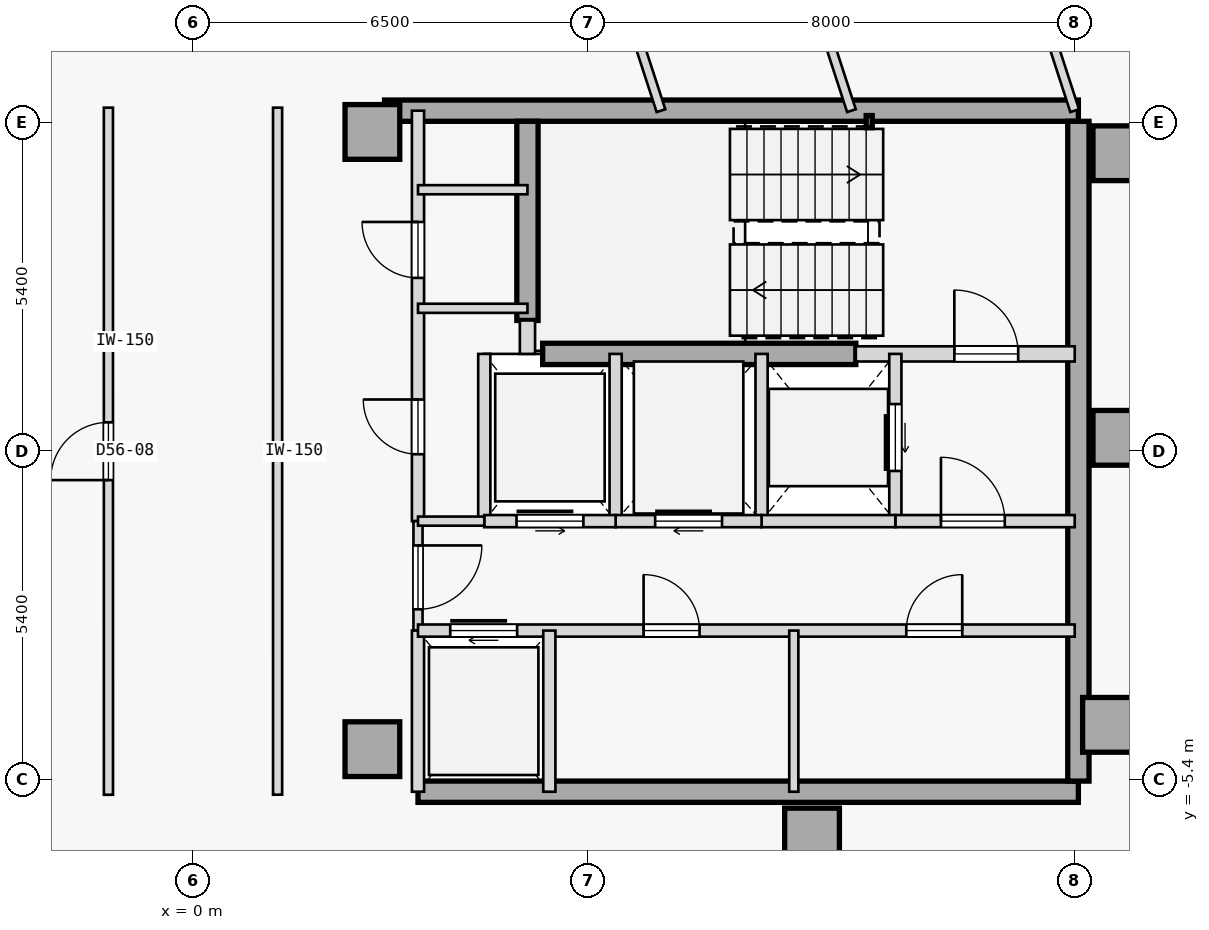
"""IFC4 building model, lengths in metres.
Left out: names, types, materials, properties, quantities, classifications, styles, units other than length and angle.
Written with IfcOpenShell. Run it as: python <this file> out.ifc"""

import sys

from ifc_helpers import new_model, si_unit, direction, frame, frame_2d, origin, origin_2d, place, context, subcontext, project, spatial, rectangle, hollow_rectangle, extrude, element, fill, save


model = new_model("IFC4")
c1 = context("Model", 3, precision=1e-05, world=origin(), true_north=direction((0.0, 1.0)))
c2 = subcontext(c1, "Body", "Model", "MODEL_VIEW")
j1 = project(units=[si_unit("LENGTHUNIT", "METRE"), si_unit("PLANEANGLEUNIT", "RADIAN")], contexts=[c1])
p1 = place(None, origin())
s1 = spatial("IfcSite", under=j1, at=p1, CompositionType="ELEMENT")
p2 = place(p1, origin())
s2 = spatial("IfcBuilding", under=s1, at=p2, CompositionType="ELEMENT")
p3 = place(p2, frame((0.0, 0.0, 214.25)))
s3 = spatial("IfcBuildingStorey", under=s2, at=p3, CompositionType="ELEMENT", Elevation=214.25)
for number, where, z_axis, x_axis in (
    (1, (15.25, 4.9, 0.0), (0.0, 0.0, 1.0), (1.0, 0.0, 0.0)),
    (2, (15.25, 0.22, 0.0), (0.0, 0.0, 1.0), (1.0, 0.0, 0.0)),
    (3, (15.08, -4.5, 0.0), (0.0, 0.0, 1.0), (1.0, 0.0, 0.0)),
    (4, (10.18, -6.32, 0.0), (0.0, 0.0, 1.0), (1.0, 0.0, 0.0)),
    (5, (2.95, -4.9, 0.0), (0.0, 0.0, 1.0), (1.0, 0.0, 0.0)),
    (6, (2.95, 5.25, 0.0), (0.0, 0.0, 1.0), (1.0, 0.0, 0.0)),
):
    element("IfcColumn", number, at=place(p3, frame(where, z_axis=z_axis, x_axis=x_axis)), inside=s3, PredefinedType="COLUMN", context=c2, shape_type="SweptSolid", body=[
        extrude(rectangle(XDim=0.9, YDim=0.9, at=origin_2d()), origin(), (0.0, 0.0, 1.0), 3.35),
    ])
p4 = place(p3, frame((3.15, 5.6, 0.0), z_axis=(0.0, 0.0, 1.0), x_axis=(1.0, 0.0, 0.0)))
e7 = element("IfcWall", 7, at=p4, inside=s3, PredefinedType="SHEAR", context=c2, shape_type="SweptSolid", body=[
    extrude(rectangle(XDim=11.41, YDim=0.35, at=frame_2d((5.705, 0.0))), origin(), (0.0, 0.0, 1.0), 3.125),
])
p5 = place(p3, frame((3.7, -5.6, 0.0), z_axis=(0.0, 0.0, 1.0), x_axis=(1.0, 0.0, 0.0)))
e8 = element("IfcWall", 8, at=p5, inside=s3, PredefinedType="SHEAR", context=c2, shape_type="SweptSolid", body=[
    extrude(rectangle(XDim=10.86, YDim=0.35, at=frame_2d((5.43, 0.0))), origin(), (0.0, 0.0, 1.0), 3.125),
])
p6 = place(p3, frame((14.56, -5.425, 0.0), z_axis=(0.0, 0.0, 1.0), x_axis=(0.0, 1.0, 0.0)))
e9 = element("IfcWall", 9, at=p6, inside=s3, PredefinedType="SHEAR", context=c2, shape_type="SweptSolid", body=[
    extrude(rectangle(XDim=10.85, YDim=0.35, at=frame_2d((5.425, 0.0))), origin(), (0.0, 0.0, 1.0), 3.125),
])
p7 = place(p3, frame((5.5, 2.15, 0.0), z_axis=(0.0, 0.0, 1.0), x_axis=(0.0, 1.0, 0.0)))
e10 = element("IfcWall", 10, at=p7, inside=s3, PredefinedType="SHEAR", context=c2, shape_type="SweptSolid", body=[
    extrude(rectangle(XDim=3.275, YDim=0.35, at=frame_2d((1.638, 0.0))), origin(), (0.0, 0.0, 1.0), 3.125),
])
p8 = place(p3, frame((5.75, 1.6, 0.0), z_axis=(0.0, 0.0, 1.0), x_axis=(1.0, 0.0, 0.0)))
e11 = element("IfcWall", 11, at=p8, inside=s3, PredefinedType="SHEAR", context=c2, shape_type="SweptSolid", body=[
    extrude(rectangle(XDim=5.15, YDim=0.35, at=frame_2d((2.575, 0.0))), origin(), (0.0, 0.0, 1.0), 3.125),
])
p9 = place(p3, frame((11.12, 5.42, 0.0), z_axis=(0.0, 0.0, 1.0), x_axis=(1.0, 0.0, 0.0)))
e12 = element("IfcColumn", 12, at=p9, inside=s3, PredefinedType="COLUMN", context=c2, shape_type="SweptSolid", body=[
    extrude(hollow_rectangle(XDim=0.1, YDim=0.2, WallThickness=0.008, at=origin_2d()), origin(), (0.0, 0.0, 1.0), 3.35),
])
p10 = place(p3, frame((10.9, 1.6, 0.0), z_axis=(0.0, 0.0, 1.0), x_axis=(1.0, 0.0, 0.0)))
e13 = element("IfcWall", 13, at=p10, inside=s3, PredefinedType="STANDARD", context=c2, shape_type="SweptSolid", body=[
    extrude(rectangle(XDim=3.6, YDim=0.25, at=frame_2d((1.8, 0.0))), origin(), (0.0, 0.0, 1.0), 3.125),
])
p11 = place(p10, frame((1.62, 0.0, 0.0)))
e14 = element("IfcOpeningElement", 14, at=p11, cuts=e13, PredefinedType="OPENING", context=c2, shape_type="SweptSolid", body=[
    extrude(rectangle(XDim=1.05, YDim=2.15, at=frame_2d((0.525, 1.075))), frame((0.0, 0.135, 0.0), z_axis=(0.0, -1.0, 0.0), x_axis=(1.0, 0.0, 0.0)), (0.0, 0.0, 1.0), 0.27),
])
p12 = place(p3, frame((5.5, 1.6, 0.0), z_axis=(0.0, 0.0, 1.0), x_axis=(0.0, 1.0, 0.0)))
e15 = element("IfcWall", 15, at=p12, inside=s3, PredefinedType="STANDARD", context=c2, shape_type="SweptSolid", body=[
    extrude(rectangle(XDim=0.55, YDim=0.25, at=frame_2d((0.275, 0.0))), origin(), (0.0, 0.0, 1.0), 3.125),
])
p13 = place(p3, frame((3.7, -1.15, 0.0), z_axis=(0.0, 0.0, 1.0), x_axis=(0.0, 1.0, 0.0)))
e16 = element("IfcWall", 16, at=p13, inside=s3, PredefinedType="STANDARD", context=c2, shape_type="SweptSolid", body=[
    extrude(rectangle(XDim=6.75, YDim=0.2, at=frame_2d((3.375, 0.0))), origin(), (0.0, 0.0, 1.0), 3.125),
])
p14 = place(p13, frame((1.1, 0.0, 0.0)))
e17 = element("IfcOpeningElement", 17, at=p14, cuts=e16, PredefinedType="OPENING", context=c2, shape_type="SweptSolid", body=[
    extrude(rectangle(XDim=0.9, YDim=2.15, at=frame_2d((0.45, 1.075))), frame((0.0, 0.11, 0.0), z_axis=(0.0, -1.0, 0.0), x_axis=(1.0, 0.0, 0.0)), (0.0, 0.0, 1.0), 0.22),
])
p15 = place(p13, frame((4.0, 0.0, 0.0)))
e18 = element("IfcOpeningElement", 18, at=p15, cuts=e16, PredefinedType="OPENING", context=c2, shape_type="SweptSolid", body=[
    extrude(rectangle(XDim=0.92, YDim=2.15, at=frame_2d((0.46, 1.075))), frame((0.0, 0.11, 0.0), z_axis=(0.0, -1.0, 0.0), x_axis=(1.0, 0.0, 0.0)), (0.0, 0.0, 1.0), 0.22),
])
p16 = place(p3, frame((3.7, -2.95, 0.0), z_axis=(0.0, 0.0, 1.0), x_axis=(0.0, 1.0, 0.0)))
e19 = element("IfcWall", 19, at=p16, inside=s3, PredefinedType="PARTITIONING", context=c2, shape_type="SweptSolid", body=[
    extrude(rectangle(XDim=1.8, YDim=0.15, at=frame_2d((0.9, 0.0))), origin(), (0.0, 0.0, 1.0), 3.125),
])
p17 = place(p16, frame((0.35, 0.0, 0.0)))
e20 = element("IfcOpeningElement", 20, at=p17, cuts=e19, PredefinedType="OPENING", context=c2, shape_type="SweptSolid", body=[
    extrude(rectangle(XDim=1.05, YDim=2.18, at=frame_2d((0.525, 1.09))), frame((0.0, 0.085, 0.0), z_axis=(0.0, -1.0, 0.0), x_axis=(1.0, 0.0, 0.0)), (0.0, 0.0, 1.0), 0.17),
])
p18 = place(p3, frame((3.7, -5.6, 0.0), z_axis=(0.0, 0.0, 1.0), x_axis=(0.0, 1.0, 0.0)))
e21 = element("IfcWall", 21, at=p18, inside=s3, PredefinedType="STANDARD", context=c2, shape_type="SweptSolid", body=[
    extrude(rectangle(XDim=2.65, YDim=0.2, at=frame_2d((1.325, 0.0))), origin(), (0.0, 0.0, 1.0), 3.125),
])
p19 = place(p3, frame((11.55, -1.15, 0.0), z_axis=(0.0, 0.0, 1.0), x_axis=(0.0, 1.0, 0.0)))
e22 = element("IfcWall", 22, at=p19, inside=s3, PredefinedType="STANDARD", context=c2, shape_type="SweptSolid", body=[
    extrude(rectangle(XDim=2.75, YDim=0.2, at=frame_2d((1.375, 0.0))), origin(), (0.0, 0.0, 1.0), 3.125),
])
p20 = place(p19, frame((0.825, 0.0, 0.0)))
e23 = element("IfcOpeningElement", 23, at=p20, cuts=e22, PredefinedType="OPENING", context=c2, shape_type="SweptSolid", body=[
    extrude(rectangle(XDim=1.1, YDim=2.15, at=frame_2d((0.55, 1.075))), frame((0.0, 0.11, 0.0), z_axis=(0.0, -1.0, 0.0), x_axis=(1.0, 0.0, 0.0)), (0.0, 0.0, 1.0), 0.22),
])
p21 = place(p3, frame((9.35, -1.15, 0.0), z_axis=(0.0, 0.0, 1.0), x_axis=(0.0, 1.0, 0.0)))
e24 = element("IfcWall", 24, at=p21, inside=s3, PredefinedType="STANDARD", context=c2, shape_type="SweptSolid", body=[
    extrude(rectangle(XDim=2.75, YDim=0.2, at=frame_2d((1.375, 0.0))), origin(), (0.0, 0.0, 1.0), 3.125),
])
p22 = place(p3, frame((11.55, -1.15, 0.0), z_axis=(0.0, 0.0, 1.0), x_axis=(1.0, 0.0, 0.0)))
e25 = element("IfcWall", 25, at=p22, inside=s3, PredefinedType="STANDARD", context=c2, shape_type="SweptSolid", body=[
    extrude(rectangle(XDim=2.95, YDim=0.2, at=frame_2d((1.475, 0.0))), origin(), (0.0, 0.0, 1.0), 3.125),
])
p23 = place(p22, frame((0.75, 0.0, 0.0)))
e26 = element("IfcOpeningElement", 26, at=p23, cuts=e25, PredefinedType="OPENING", context=c2, shape_type="SweptSolid", body=[
    extrude(rectangle(XDim=1.05, YDim=2.18, at=frame_2d((0.525, 1.09))), frame((0.0, 0.11, 0.0), z_axis=(0.0, -1.0, 0.0), x_axis=(1.0, 0.0, 0.0)), (0.0, 0.0, 1.0), 0.22),
])
p24 = place(p3, frame((9.35, -1.15, 0.0), z_axis=(0.0, 0.0, 1.0), x_axis=(1.0, 0.0, 0.0)))
e27 = element("IfcWall", 27, at=p24, inside=s3, PredefinedType="STANDARD", context=c2, shape_type="SweptSolid", body=[
    extrude(rectangle(XDim=2.2, YDim=0.2, at=frame_2d((1.1, 0.0))), origin(), (0.0, 0.0, 1.0), 3.125),
])
p25 = place(p3, frame((6.95, -1.15, 0.0), z_axis=(0.0, 0.0, 1.0), x_axis=(0.0, 1.0, 0.0)))
e28 = element("IfcWall", 28, at=p25, inside=s3, PredefinedType="STANDARD", context=c2, shape_type="SweptSolid", body=[
    extrude(rectangle(XDim=2.75, YDim=0.2, at=frame_2d((1.375, 0.0))), origin(), (0.0, 0.0, 1.0), 3.125),
])
p26 = place(p3, frame((6.95, -1.15, 0.0), z_axis=(0.0, 0.0, 1.0), x_axis=(1.0, 0.0, 0.0)))
e29 = element("IfcWall", 29, at=p26, inside=s3, PredefinedType="STANDARD", context=c2, shape_type="SweptSolid", body=[
    extrude(rectangle(XDim=2.4, YDim=0.2, at=frame_2d((1.2, 0.0))), origin(), (0.0, 0.0, 1.0), 3.125),
])
p27 = place(p26, frame((0.65, 0.0, 0.0)))
e30 = element("IfcOpeningElement", 30, at=p27, cuts=e29, PredefinedType="OPENING", context=c2, shape_type="SweptSolid", body=[
    extrude(rectangle(XDim=1.1, YDim=2.15, at=frame_2d((0.55, 1.075))), frame((0.0, 0.11, 0.0), z_axis=(0.0, -1.0, 0.0), x_axis=(1.0, 0.0, 0.0)), (0.0, 0.0, 1.0), 0.22),
])
p28 = place(p3, frame((4.79, -1.15, 0.0), z_axis=(0.0, 0.0, 1.0), x_axis=(0.0, 1.0, 0.0)))
e31 = element("IfcWall", 31, at=p28, inside=s3, PredefinedType="STANDARD", context=c2, shape_type="SweptSolid", body=[
    extrude(rectangle(XDim=2.75, YDim=0.2, at=frame_2d((1.375, 0.0))), origin(), (0.0, 0.0, 1.0), 3.125),
])
p29 = place(p3, frame((4.79, -1.15, 0.0), z_axis=(0.0, 0.0, 1.0), x_axis=(1.0, 0.0, 0.0)))
e32 = element("IfcWall", 32, at=p29, inside=s3, PredefinedType="STANDARD", context=c2, shape_type="SweptSolid", body=[
    extrude(rectangle(XDim=2.16, YDim=0.2, at=frame_2d((1.08, 0.0))), origin(), (0.0, 0.0, 1.0), 3.125),
])
p30 = place(p29, frame((0.53, 0.0, 0.0)))
e33 = element("IfcOpeningElement", 33, at=p30, cuts=e32, PredefinedType="OPENING", context=c2, shape_type="SweptSolid", body=[
    extrude(rectangle(XDim=1.1, YDim=2.15, at=frame_2d((0.55, 1.075))), frame((0.0, 0.11, 0.0), z_axis=(0.0, -1.0, 0.0), x_axis=(1.0, 0.0, 0.0)), (0.0, 0.0, 1.0), 0.22),
])
p31 = place(p3, frame((3.7, -1.15, 0.0), z_axis=(0.0, 0.0, 1.0), x_axis=(1.0, 0.0, 0.0)))
e34 = element("IfcWall", 34, at=p31, inside=s3, PredefinedType="PARTITIONING", context=c2, shape_type="SweptSolid", body=[
    extrude(rectangle(XDim=1.09, YDim=0.15, at=frame_2d((0.545, 0.0))), origin(), (0.0, 0.0, 1.0), 3.125),
])
p32 = place(p3, frame((3.7, -2.95, 0.0), z_axis=(0.0, 0.0, 1.0), x_axis=(1.0, 0.0, 0.0)))
e35 = element("IfcWall", 35, at=p32, inside=s3, PredefinedType="STANDARD", context=c2, shape_type="SweptSolid", body=[
    extrude(rectangle(XDim=10.8, YDim=0.2, at=frame_2d((5.4, 0.0))), origin(), (0.0, 0.0, 1.0), 3.125),
])
p33 = place(p32, frame((0.53, 0.0, 0.0)))
e36 = element("IfcOpeningElement", 36, at=p33, cuts=e35, PredefinedType="OPENING", context=c2, shape_type="SweptSolid", body=[
    extrude(rectangle(XDim=1.1, YDim=2.15, at=frame_2d((0.55, 1.075))), frame((0.0, 0.11, 0.0), z_axis=(0.0, -1.0, 0.0), x_axis=(1.0, 0.0, 0.0)), (0.0, 0.0, 1.0), 0.22),
])
p34 = place(p32, frame((3.71, 0.0, 0.0)))
e37 = element("IfcOpeningElement", 37, at=p34, cuts=e35, PredefinedType="OPENING", context=c2, shape_type="SweptSolid", body=[
    extrude(rectangle(XDim=0.92, YDim=2.15, at=frame_2d((0.46, 1.075))), frame((0.0, 0.11, 0.0), z_axis=(0.0, -1.0, 0.0), x_axis=(1.0, 0.0, 0.0)), (0.0, 0.0, 1.0), 0.22),
])
p35 = place(p32, frame((8.03, 0.0, 0.0)))
e38 = element("IfcOpeningElement", 38, at=p35, cuts=e35, PredefinedType="OPENING", context=c2, shape_type="SweptSolid", body=[
    extrude(rectangle(XDim=0.92, YDim=2.15, at=frame_2d((0.46, 1.075))), frame((0.0, 0.11, 0.0), z_axis=(0.0, -1.0, 0.0), x_axis=(1.0, 0.0, 0.0)), (0.0, 0.0, 1.0), 0.22),
])
p36 = place(p3, frame((5.86, -5.6, 0.0), z_axis=(0.0, 0.0, 1.0), x_axis=(0.0, 1.0, 0.0)))
e39 = element("IfcWall", 39, at=p36, inside=s3, PredefinedType="STANDARD", context=c2, shape_type="SweptSolid", body=[
    extrude(rectangle(XDim=2.65, YDim=0.2, at=frame_2d((1.325, 0.0))), origin(), (0.0, 0.0, 1.0), 3.125),
])
p37 = place(p3, frame((9.88, -5.6, 0.0), z_axis=(0.0, 0.0, 1.0), x_axis=(0.0, 1.0, 0.0)))
e40 = element("IfcWall", 40, at=p37, inside=s3, PredefinedType="PARTITIONING", context=c2, shape_type="SweptSolid", body=[
    extrude(rectangle(XDim=2.65, YDim=0.15, at=frame_2d((1.325, 0.0))), origin(), (0.0, 0.0, 1.0), 3.125),
])
for number, where, z_axis, x_axis in (
    (41, (3.7, 4.3, 0.0), (0.0, 0.0, 1.0), (1.0, 0.0, 0.0)),
    (42, (3.7, 2.35, 0.0), (0.0, 0.0, 1.0), (1.0, 0.0, 0.0)),
):
    element("IfcWall", number, at=place(p3, frame(where, z_axis=z_axis, x_axis=x_axis)), inside=s3, PredefinedType="PARTITIONING", context=c2, shape_type="SweptSolid", body=[
        extrude(rectangle(XDim=1.8, YDim=0.15, at=frame_2d((0.9, 0.0))), origin(), (0.0, 0.0, 1.0), 3.125),
    ])
p38 = place(p3, frame((-1.391, -5.65, 0.0), z_axis=(0.0, 0.0, 1.0), x_axis=(-8.6422954e-05, 0.999999996266, 0.0)))
e43 = element("IfcWall", 43, at=p38, inside=s3, PredefinedType="PARTITIONING", context=c2, shape_type="SweptSolid", body=[
    extrude(rectangle(XDim=11.3, YDim=0.15, at=frame_2d((5.65, 0.0))), origin(), (0.0, 0.0, 1.0), 3.125),
])
p39 = place(p38, frame((5.175, 0.0, 0.0)))
e44 = element("IfcOpeningElement", 44, at=p39, cuts=e43, PredefinedType="OPENING", context=c2, shape_type="SweptSolid", body=[
    extrude(rectangle(XDim=0.95, YDim=2.15, at=frame_2d((0.475, 1.075))), frame((0.0, 0.085, 0.0), z_axis=(0.0, -1.0, 0.0), x_axis=(1.0, 0.0, 0.0)), (0.0, 0.0, 1.0), 0.17),
])
p40 = place(p3, frame((1.391, -5.648, 0.0), z_axis=(0.0, 0.0, 1.0), x_axis=(-4.3218947e-05, 0.999999999066, 0.0)))
e45 = element("IfcWall", 45, at=p40, inside=s3, PredefinedType="PARTITIONING", context=c2, shape_type="SweptSolid", body=[
    extrude(rectangle(XDim=11.298, YDim=0.15, at=frame_2d((5.649, 0.0))), origin(), (0.0, 0.0, 1.0), 3.125),
])
p41 = place(p3, frame((7.696, 5.599, 0.0), z_axis=(0.0, 0.0, 1.0), x_axis=(-0.309022497646, 0.951054728157, 0.0)))
e46 = element("IfcWall", 46, at=p41, inside=s3, PredefinedType="PARTITIONING", context=c2, shape_type="SweptSolid", body=[
    extrude(rectangle(XDim=6.86, YDim=0.15, at=frame_2d((3.43, 0.0))), origin(), (0.0, 0.0, 1.0), 3.125),
])
p42 = place(p3, frame((10.828, 5.6, 0.0), z_axis=(0.0, 0.0, 1.0), x_axis=(-0.30901342663, 0.951057675519, 0.0)))
e47 = element("IfcWall", 47, at=p42, inside=s3, PredefinedType="PARTITIONING", context=c2, shape_type="SweptSolid", body=[
    extrude(rectangle(XDim=7.827, YDim=0.15, at=frame_2d((3.914, 0.0))), origin(), (0.0, 0.0, 1.0), 3.125),
])
p43 = place(p3, frame((14.5, 5.6, 0.0), z_axis=(0.0, 0.0, 1.0), x_axis=(-0.308872364299, 0.951103497298, 0.0)))
e48 = element("IfcWall", 48, at=p43, inside=s3, PredefinedType="PARTITIONING", context=c2, shape_type="SweptSolid", body=[
    extrude(rectangle(XDim=1.705, YDim=0.15, at=frame_2d((0.853, 0.0))), origin(), (0.0, 0.0, 1.0), 3.125),
])
p44 = place(p11, origin())
e49 = element("IfcDoor", 49, at=p44, inside=s3, OperationType="SINGLE_SWING_LEFT", PredefinedType="DOOR", context=c2, shape_type="SweptSolid", body=[
    extrude(rectangle(XDim=1.05, YDim=2.15, at=frame_2d((0.525, 1.075))), frame((0.0, 0.025, 0.0), z_axis=(0.0, -1.0, 0.0), x_axis=(1.0, 0.0, 0.0)), (0.0, 0.0, 1.0), 0.05),
])
fill(e14, e49)
p45 = place(p23, origin())
e50 = element("IfcDoor", 50, at=p45, inside=s3, OperationType="SINGLE_SWING_LEFT", PredefinedType="DOOR", context=c2, shape_type="SweptSolid", body=[
    extrude(rectangle(XDim=1.05, YDim=2.18, at=frame_2d((0.525, 1.09))), frame((0.0, 0.025, 0.0), z_axis=(0.0, -1.0, 0.0), x_axis=(1.0, 0.0, 0.0)), (0.0, 0.0, 1.0), 0.05),
])
fill(e26, e50)
p46 = place(p17, frame((1.05, 0.0, 0.0), z_axis=(0.0, 0.0, 1.0), x_axis=(-1.0, 0.0, 0.0)))
e51 = element("IfcDoor", 51, at=p46, inside=s3, OperationType="SINGLE_SWING_RIGHT", PredefinedType="DOOR", context=c2, shape_type="SweptSolid", body=[
    extrude(rectangle(XDim=1.05, YDim=2.18, at=frame_2d((0.525, 1.09))), frame((0.0, 0.025, 0.0), z_axis=(0.0, -1.0, 0.0), x_axis=(1.0, 0.0, 0.0)), (0.0, 0.0, 1.0), 0.05),
])
fill(e20, e51)
p47 = place(p20, origin())
e52 = element("IfcDoor", 52, at=p47, inside=s3, OperationType="SLIDING_TO_RIGHT", PredefinedType="DOOR", context=c2, shape_type="SweptSolid", body=[
    extrude(rectangle(XDim=1.1, YDim=2.15, at=frame_2d((0.55, 1.075))), frame((0.0, 0.025, 0.0), z_axis=(0.0, -1.0, 0.0), x_axis=(1.0, 0.0, 0.0)), (0.0, 0.0, 1.0), 0.05),
])
fill(e23, e52)
p48 = place(p27, origin())
e53 = element("IfcDoor", 53, at=p48, inside=s3, OperationType="SLIDING_TO_RIGHT", PredefinedType="DOOR", context=c2, shape_type="SweptSolid", body=[
    extrude(rectangle(XDim=1.1, YDim=2.15, at=frame_2d((0.55, 1.075))), frame((0.0, 0.025, 0.0), z_axis=(0.0, -1.0, 0.0), x_axis=(1.0, 0.0, 0.0)), (0.0, 0.0, 1.0), 0.05),
])
fill(e30, e53)
p49 = place(p30, origin())
e54 = element("IfcDoor", 54, at=p49, inside=s3, OperationType="SLIDING_TO_LEFT", PredefinedType="DOOR", context=c2, shape_type="SweptSolid", body=[
    extrude(rectangle(XDim=1.1, YDim=2.15, at=frame_2d((0.55, 1.075))), frame((0.0, 0.025, 0.0), z_axis=(0.0, -1.0, 0.0), x_axis=(1.0, 0.0, 0.0)), (0.0, 0.0, 1.0), 0.05),
])
fill(e33, e54)
p50 = place(p33, origin())
e55 = element("IfcDoor", 55, at=p50, inside=s3, OperationType="SLIDING_TO_RIGHT", PredefinedType="DOOR", context=c2, shape_type="SweptSolid", body=[
    extrude(rectangle(XDim=1.1, YDim=2.15, at=frame_2d((0.55, 1.075))), frame((0.0, 0.025, 0.0), z_axis=(0.0, -1.0, 0.0), x_axis=(1.0, 0.0, 0.0)), (0.0, 0.0, 1.0), 0.05),
])
fill(e36, e55)
p51 = place(p34, origin())
e56 = element("IfcDoor", 56, at=p51, inside=s3, OperationType="SINGLE_SWING_LEFT", PredefinedType="DOOR", context=c2, shape_type="SweptSolid", body=[
    extrude(rectangle(XDim=0.92, YDim=2.15, at=frame_2d((0.46, 1.075))), frame((0.0, 0.025, 0.0), z_axis=(0.0, -1.0, 0.0), x_axis=(1.0, 0.0, 0.0)), (0.0, 0.0, 1.0), 0.05),
])
fill(e37, e56)
p52 = place(p35, origin())
e57 = element("IfcDoor", 57, at=p52, inside=s3, OperationType="SINGLE_SWING_RIGHT", PredefinedType="DOOR", context=c2, shape_type="SweptSolid", body=[
    extrude(rectangle(XDim=0.92, YDim=2.15, at=frame_2d((0.46, 1.075))), frame((0.0, 0.025, 0.0), z_axis=(0.0, -1.0, 0.0), x_axis=(1.0, 0.0, 0.0)), (0.0, 0.0, 1.0), 0.05),
])
fill(e38, e57)
p53 = place(p14, origin())
e58 = element("IfcDoor", 58, at=p53, inside=s3, OperationType="SINGLE_SWING_RIGHT", PredefinedType="DOOR", context=c2, shape_type="SweptSolid", body=[
    extrude(rectangle(XDim=0.9, YDim=2.15, at=frame_2d((0.45, 1.075))), frame((0.0, 0.025, 0.0), z_axis=(0.0, -1.0, 0.0), x_axis=(1.0, 0.0, 0.0)), (0.0, 0.0, 1.0), 0.05),
])
fill(e17, e58)
p54 = place(p15, origin())
e59 = element("IfcDoor", 59, at=p54, inside=s3, OperationType="SINGLE_SWING_RIGHT", PredefinedType="DOOR", context=c2, shape_type="SweptSolid", body=[
    extrude(rectangle(XDim=0.92, YDim=2.15, at=frame_2d((0.46, 1.075))), frame((0.0, 0.025, 0.0), z_axis=(0.0, -1.0, 0.0), x_axis=(1.0, 0.0, 0.0)), (0.0, 0.0, 1.0), 0.05),
])
fill(e18, e59)
p55 = place(p39, origin())
e60 = element("IfcDoor", 60, at=p55, inside=s3, OperationType="SINGLE_SWING_LEFT", PredefinedType="DOOR", context=c2, shape_type="SweptSolid", body=[
    extrude(rectangle(XDim=0.95, YDim=2.15, at=frame_2d((0.475, 1.075))), frame((0.0, 0.025, 0.0), z_axis=(0.0, -1.0, 0.0), x_axis=(1.0, 0.0, 0.0)), (0.0, 0.0, 1.0), 0.05),
])
fill(e44, e60)
save(model, sys.argv[1])
